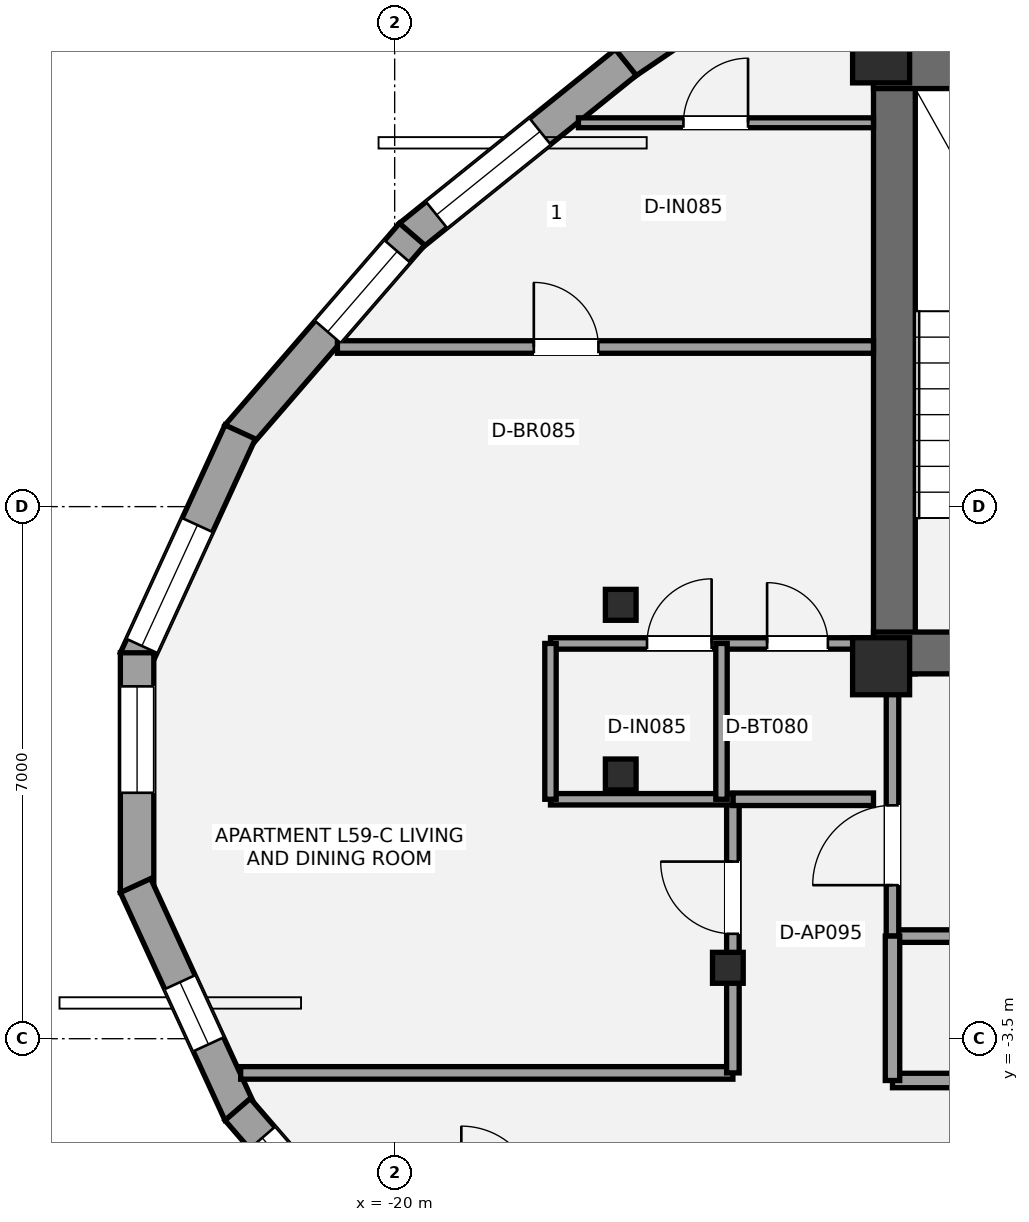
"""IFC4 building model, lengths in metres.
Left out: names, types, materials, properties, quantities, classifications, styles, units other than length and angle.
Written with IfcOpenShell. Run it as: python <this file> out.ifc"""

import sys

from ifc_helpers import new_model, si_unit, direction, frame, frame_2d, origin, origin_2d, place, context, subcontext, project, spatial, rectangle, i_section, extrude, element, fill, save


model = new_model("IFC4")
c1 = context("Model", 3, precision=1e-05, world=origin(), true_north=direction((0.0, 1.0)))
c2 = subcontext(c1, "Body", "Model", "MODEL_VIEW")
j1 = project(units=[si_unit("LENGTHUNIT", "METRE"), si_unit("PLANEANGLEUNIT", "RADIAN")], contexts=[c1])
p1 = place(None, origin())
s1 = spatial("IfcSite", under=j1, at=p1, CompositionType="ELEMENT")
p2 = place(p1, origin())
s2 = spatial("IfcBuilding", under=s1, at=p2, CompositionType="ELEMENT")
p3 = place(p2, frame((0.0, 0.0, 213.15)))
s3 = spatial("IfcBuildingStorey", under=s2, at=p3, CompositionType="ELEMENT", Elevation=213.15)
p4 = place(p3, frame((-13.425, 1.3, 0.0), z_axis=(0.0, 0.0, 1.0), x_axis=(0.0, 1.0, 0.0)))
e1 = element("IfcWall", 1, at=p4, inside=s3, PredefinedType="SHEAR", context=c2, shape_type="SweptSolid", body=[
    extrude(rectangle(XDim=8.25, YDim=0.55, at=frame_2d((4.125, 0.0))), origin(), (0.0, 0.0, 1.0), 3.15),
])
p5 = place(p3, frame((-13.7, 9.275, 0.0), z_axis=(0.0, 0.0, 1.0), x_axis=(1.0, 0.0, 0.0)))
e2 = element("IfcWall", 2, at=p5, inside=s3, PredefinedType="SHEAR", context=c2, shape_type="SweptSolid", body=[
    extrude(rectangle(XDim=9.175, YDim=0.55, at=frame_2d((4.587, 0.0))), origin(), (0.0, 0.0, 1.0), 3.15),
])
p6 = place(p3, frame((-4.925, 1.575, 0.0), z_axis=(0.0, 0.0, 1.0), x_axis=(-1.0, 0.0, 0.0)))
e3 = element("IfcWall", 3, at=p6, inside=s3, PredefinedType="SHEAR", context=c2, shape_type="SweptSolid", body=[
    extrude(rectangle(XDim=8.775, YDim=0.55, at=frame_2d((4.387, 0.0))), origin(), (0.0, 0.0, 1.0), 3.15),
])
p7 = place(p6, frame((5.375, 0.0, 0.0)))
e4 = element("IfcOpeningElement", 4, at=p7, cuts=e3, PredefinedType="OPENING", context=c2, shape_type="SweptSolid", body=[
    extrude(rectangle(XDim=1.05, YDim=2.15, at=frame_2d((0.525, 1.075))), frame((0.0, 0.285, 0.0), z_axis=(0.0, -1.0, 0.0), x_axis=(1.0, 0.0, 0.0)), (0.0, 0.0, 1.0), 0.57),
])
p8 = place(p6, frame((3.705, 0.0, 0.0)))
e5 = element("IfcOpeningElement", 5, at=p8, cuts=e3, PredefinedType="OPENING", context=c2, shape_type="SweptSolid", body=[
    extrude(rectangle(XDim=1.1, YDim=2.2, at=frame_2d((0.55, 1.1))), frame((0.0, 0.285, 0.0), z_axis=(0.0, -1.0, 0.0), x_axis=(1.0, 0.0, 0.0)), (0.0, 0.0, 1.0), 0.57),
])
for number, where, z_axis, x_axis in (
    (6, (-13.6, 1.4, 0.0), (0.0, 0.0, 1.0), (1.0, 0.0, 0.0)),
    (7, (-13.6, 9.45, 0.0), (0.0, 0.0, 1.0), (1.0, 0.0, 0.0)),
):
    element("IfcColumn", number, at=place(p3, frame(where, z_axis=z_axis, x_axis=x_axis)), inside=s3, PredefinedType="PILASTER", context=c2, shape_type="SweptSolid", body=[
        extrude(rectangle(XDim=0.75, YDim=0.75, at=origin_2d()), origin(), (0.0, 0.0, 1.0), 3.15),
    ])
for number, where, z_axis, x_axis in (
    (8, (-17.026, 2.208, 0.0), (0.0, 0.0, 1.0), (1.0, 0.0, 0.0)),
    (9, (-17.026, -0.024, 0.0), (0.0, 0.0, 1.0), (1.0, 0.0, 0.0)),
    (10, (-15.616, -2.567, 0.0), (0.0, 0.0, 1.0), (1.0, 0.0, 0.0)),
):
    element("IfcColumn", number, at=place(p3, frame(where, z_axis=z_axis, x_axis=x_axis)), inside=s3, PredefinedType="COLUMN", context=c2, shape_type="SweptSolid", body=[
        extrude(i_section(OverallWidth=0.404, OverallDepth=0.407, WebThickness=0.027, FlangeThickness=0.044, at=origin_2d()), origin(), (0.0, 0.0, 1.0), 3.15),
    ])
p9 = place(p3, frame((-16.973, 9.334, 0.0), z_axis=(0.0, 0.0, 1.0), x_axis=(0.827592777121, 0.561328954586, 0.0)))
e11 = element("IfcWall", 11, at=p9, inside=s3, PredefinedType="STANDARD", context=c2, shape_type="SweptSolid", body=[
    extrude(rectangle(XDim=3.704, YDim=0.44, at=frame_2d((1.852, 0.0))), origin(), (0.0, 0.0, 1.0), 2.336),
])
p10 = place(p9, frame((2.555, 0.0, 0.58)))
e12 = element("IfcOpeningElement", 12, at=p10, cuts=e11, PredefinedType="OPENING", context=c2, shape_type="SweptSolid", body=[
    extrude(rectangle(XDim=0.9, YDim=1.35, at=frame_2d((0.45, 0.675))), frame((0.0, 0.23, 0.0), z_axis=(0.0, -1.0, 0.0), x_axis=(1.0, 0.0, 0.0)), (0.0, 0.0, 1.0), 0.46),
])
p11 = place(p3, frame((-19.8, 7.057, 0.0), z_axis=(0.0, 0.0, 1.0), x_axis=(0.778794775864, 0.627278803314, 0.0)))
e13 = element("IfcWall", 13, at=p11, inside=s3, PredefinedType="STANDARD", context=c2, shape_type="SweptSolid", body=[
    extrude(rectangle(XDim=3.648, YDim=0.44, at=frame_2d((1.824, 0.0))), origin(), (0.0, 0.0, 1.0), 2.336),
])
p12 = place(p11, frame((0.45, 0.0, 0.55)))
e14 = element("IfcOpeningElement", 14, at=p12, cuts=e13, PredefinedType="OPENING", context=c2, shape_type="SweptSolid", body=[
    extrude(rectangle(XDim=1.75, YDim=1.55, at=frame_2d((0.875, 0.775))), frame((0.0, 0.23, 0.0), z_axis=(0.0, -1.0, 0.0), x_axis=(1.0, 0.0, 0.0)), (0.0, 0.0, 1.0), 0.46),
])
p13 = place(p3, frame((-22.066, 4.43, 0.0), z_axis=(0.0, 0.0, 1.0), x_axis=(0.654143325051, 0.75637061702, 0.0)))
e15 = element("IfcWall", 15, at=p13, inside=s3, PredefinedType="STANDARD", context=c2, shape_type="SweptSolid", body=[
    extrude(rectangle(XDim=3.508, YDim=0.44, at=frame_2d((1.754, 0.0))), origin(), (0.0, 0.0, 1.0), 2.336),
])
p14 = place(p13, frame((1.811, 0.0, 0.58)))
e16 = element("IfcOpeningElement", 16, at=p14, cuts=e15, PredefinedType="OPENING", context=c2, shape_type="SweptSolid", body=[
    extrude(rectangle(XDim=1.4, YDim=1.55, at=frame_2d((0.7, 0.775))), frame((0.0, 0.23, 0.0), z_axis=(0.0, -1.0, 0.0), x_axis=(1.0, 0.0, 0.0)), (0.0, 0.0, 1.0), 0.46),
])
p15 = place(p3, frame((-23.409, 1.485, 0.0), z_axis=(0.0, 0.0, 1.0), x_axis=(0.417358097416, 0.908742107818, 0.0)))
e17 = element("IfcWall", 17, at=p15, inside=s3, PredefinedType="STANDARD", context=c2, shape_type="SweptSolid", body=[
    extrude(rectangle(XDim=3.298, YDim=0.44, at=frame_2d((1.649, 0.0))), origin(), (0.0, 0.0, 1.0), 2.336),
])
p16 = place(p15, frame((0.2, 0.0, 0.55)))
e18 = element("IfcOpeningElement", 18, at=p16, cuts=e17, PredefinedType="OPENING", context=c2, shape_type="SweptSolid", body=[
    extrude(rectangle(XDim=1.75, YDim=1.55, at=frame_2d((0.875, 0.775))), frame((0.0, 0.23, 0.0), z_axis=(0.0, -1.0, 0.0), x_axis=(1.0, 0.0, 0.0)), (0.0, 0.0, 1.0), 0.46),
])
p17 = place(p3, frame((-23.389, -1.577, 0.0), z_axis=(0.0, 0.0, 1.0), x_axis=(0.0, 1.0, 0.0)))
e19 = element("IfcWall", 19, at=p17, inside=s3, PredefinedType="STANDARD", context=c2, shape_type="SweptSolid", body=[
    extrude(rectangle(XDim=3.154, YDim=0.44, at=frame_2d((1.577, 0.0))), origin(), (0.0, 0.0, 1.0), 2.336),
])
p18 = place(p17, frame((1.312, 0.0, 0.55)))
e20 = element("IfcOpeningElement", 20, at=p18, cuts=e19, PredefinedType="OPENING", context=c2, shape_type="SweptSolid", body=[
    extrude(rectangle(XDim=1.4, YDim=1.55, at=frame_2d((0.7, 0.775))), frame((0.0, 0.23, 0.0), z_axis=(0.0, -1.0, 0.0), x_axis=(1.0, 0.0, 0.0)), (0.0, 0.0, 1.0), 0.46),
])
p19 = place(p3, frame((-22.033, -4.482, 0.0), z_axis=(0.0, 0.0, 1.0), x_axis=(-0.417358097416, 0.908742107818, 0.0)))
e21 = element("IfcWall", 21, at=p19, inside=s3, PredefinedType="STANDARD", context=c2, shape_type="SweptSolid", body=[
    extrude(rectangle(XDim=3.298, YDim=0.44, at=frame_2d((1.649, 0.0))), origin(), (0.0, 0.0, 1.0), 2.336),
])
p20 = place(p19, frame((0.999, 0.0, 0.58)))
e22 = element("IfcOpeningElement", 22, at=p20, cuts=e21, PredefinedType="OPENING", context=c2, shape_type="SweptSolid", body=[
    extrude(rectangle(XDim=0.9, YDim=1.35, at=frame_2d((0.45, 0.675))), frame((0.0, 0.23, 0.0), z_axis=(0.0, -1.0, 0.0), x_axis=(1.0, 0.0, 0.0)), (0.0, 0.0, 1.0), 0.46),
])
p21 = place(p3, frame((-19.771, -7.084, 0.0), z_axis=(0.0, 0.0, 1.0), x_axis=(-0.654143325051, 0.75637061702, 0.0)))
e23 = element("IfcWall", 23, at=p21, inside=s3, PredefinedType="STANDARD", context=c2, shape_type="SweptSolid", body=[
    extrude(rectangle(XDim=3.508, YDim=0.44, at=frame_2d((1.754, 0.0))), origin(), (0.0, 0.0, 1.0), 2.336),
])
p22 = place(p21, frame((2.114, 0.0, 0.58)))
e24 = element("IfcOpeningElement", 24, at=p22, cuts=e23, PredefinedType="OPENING", context=c2, shape_type="SweptSolid", body=[
    extrude(rectangle(XDim=0.9, YDim=1.35, at=frame_2d((0.45, 0.675))), frame((0.0, 0.23, 0.0), z_axis=(0.0, -1.0, 0.0), x_axis=(1.0, 0.0, 0.0)), (0.0, 0.0, 1.0), 0.46),
])
p23 = place(p3, frame((-13.45, -2.15, 0.0), z_axis=(0.0, 0.0, 1.0), x_axis=(1.0, 0.0, 0.0)))
e25 = element("IfcWall", 25, at=p23, inside=s3, PredefinedType="PARTITIONING", context=c2, shape_type="SweptSolid", body=[
    extrude(rectangle(XDim=6.25, YDim=0.165, at=frame_2d((3.125, 0.0))), origin(), (0.0, 0.0, 1.0), 2.423),
])
p24 = place(p3, frame((-13.45, -2.15, 0.0), z_axis=(0.0, 0.0, 1.0), x_axis=(0.0, 1.0, 0.0)))
e26 = element("IfcWall", 26, at=p24, inside=s3, PredefinedType="PARTITIONING", context=c2, shape_type="SweptSolid", body=[
    extrude(rectangle(XDim=3.5, YDim=0.165, at=frame_2d((1.75, 0.0))), origin(), (0.0, 0.0, 1.0), 2.423),
])
p25 = place(p24, frame((0.67, 0.0, 0.0)))
e27 = element("IfcOpeningElement", 27, at=p25, cuts=e26, PredefinedType="OPENING", context=c2, shape_type="SweptSolid", body=[
    extrude(rectangle(XDim=1.05, YDim=2.15, at=frame_2d((0.525, 1.075))), frame((0.0, 0.093, 0.0), z_axis=(0.0, -1.0, 0.0), x_axis=(1.0, 0.0, 0.0)), (0.0, 0.0, 1.0), 0.185),
])
p26 = place(p3, frame((-13.45, -4.05, 0.0), z_axis=(0.0, 0.0, 1.0), x_axis=(1.0, 0.0, 0.0)))
e28 = element("IfcWall", 28, at=p26, inside=s3, PredefinedType="PLUMBINGWALL", context=c2, shape_type="SweptSolid", body=[
    extrude(rectangle(XDim=11.35, YDim=0.19, at=frame_2d((5.675, 0.0))), origin(), (0.0, 0.0, 1.0), 2.357),
])
p27 = place(p26, frame((1.25, 0.0, 0.0)))
e29 = element("IfcOpeningElement", 29, at=p27, cuts=e28, PredefinedType="OPENING", context=c2, shape_type="SweptSolid", body=[
    extrude(rectangle(XDim=0.85, YDim=2.1, at=frame_2d((0.425, 1.05))), frame((0.0, 0.105, 0.0), z_axis=(0.0, -1.0, 0.0), x_axis=(1.0, 0.0, 0.0)), (0.0, 0.0, 1.0), 0.21),
])
p28 = place(p26, frame((5.1, 0.0, 0.0)))
e30 = element("IfcOpeningElement", 30, at=p28, cuts=e28, PredefinedType="OPENING", context=c2, shape_type="SweptSolid", body=[
    extrude(rectangle(XDim=0.85, YDim=2.1, at=frame_2d((0.425, 1.05))), frame((0.0, 0.105, 0.0), z_axis=(0.0, -1.0, 0.0), x_axis=(1.0, 0.0, 0.0)), (0.0, 0.0, 1.0), 0.21),
])
p29 = place(p26, frame((8.95, 0.0, 0.0)))
e31 = element("IfcOpeningElement", 31, at=p29, cuts=e28, PredefinedType="OPENING", context=c2, shape_type="SweptSolid", body=[
    extrude(rectangle(XDim=0.95, YDim=2.15, at=frame_2d((0.475, 1.075))), frame((0.0, 0.105, 0.0), z_axis=(0.0, -1.0, 0.0), x_axis=(1.0, 0.0, 0.0)), (0.0, 0.0, 1.0), 0.21),
])
p30 = place(p3, frame((-13.45, -4.05, 0.0), z_axis=(0.0, 0.0, 1.0), x_axis=(0.0, 1.0, 0.0)))
e32 = element("IfcWall", 32, at=p30, inside=s3, PredefinedType="PLUMBINGWALL", context=c2, shape_type="SweptSolid", body=[
    extrude(rectangle(XDim=1.9, YDim=0.19, at=frame_2d((0.95, 0.0))), origin(), (0.0, 0.0, 1.0), 2.423),
])
p31 = place(p3, frame((-22.026, -3.95, 0.0), z_axis=(0.0, 0.0, 1.0), x_axis=(1.0, 0.0, 0.0)))
e33 = element("IfcWall", 33, at=p31, inside=s3, PredefinedType="PARTITIONING", context=c2, shape_type="SweptSolid", body=[
    extrude(rectangle(XDim=6.476, YDim=0.165, at=frame_2d((3.238, 0.0))), origin(), (0.0, 0.0, 1.0), 2.423),
])
p32 = place(p3, frame((-15.55, -3.95, 0.0), z_axis=(0.0, 0.0, 1.0), x_axis=(0.0, 1.0, 0.0)))
e34 = element("IfcWall", 34, at=p32, inside=s3, PredefinedType="PARTITIONING", context=c2, shape_type="SweptSolid", body=[
    extrude(rectangle(XDim=3.6, YDim=0.165, at=frame_2d((1.8, 0.0))), origin(), (0.0, 0.0, 1.0), 2.357),
])
p33 = place(p32, frame((1.83, 0.0, 0.0)))
e35 = element("IfcOpeningElement", 35, at=p33, cuts=e34, PredefinedType="OPENING", context=c2, shape_type="SweptSolid", body=[
    extrude(rectangle(XDim=0.95, YDim=2.15, at=frame_2d((0.475, 1.075))), frame((0.0, 0.093, 0.0), z_axis=(0.0, -1.0, 0.0), x_axis=(1.0, 0.0, 0.0)), (0.0, 0.0, 1.0), 0.185),
])
p34 = place(p3, frame((-15.55, -0.35, 0.0), z_axis=(0.0, 0.0, 1.0), x_axis=(1.0, 0.0, 0.0)))
e36 = element("IfcWall", 36, at=p34, inside=s3, PredefinedType="PARTITIONING", context=c2, shape_type="SweptSolid", body=[
    extrude(rectangle(XDim=1.85, YDim=0.165, at=frame_2d((0.925, 0.0))), origin(), (0.0, 0.0, 1.0), 2.423),
])
p35 = place(p3, frame((-20.753, 5.6, 0.0), z_axis=(0.0, 0.0, 1.0), x_axis=(1.0, 0.0, 0.0)))
e37 = element("IfcWall", 37, at=p35, inside=s3, PredefinedType="PARTITIONING", context=c2, shape_type="SweptSolid", body=[
    extrude(rectangle(XDim=7.053, YDim=0.165, at=frame_2d((3.527, 0.0))), origin(), (0.0, 0.0, 1.0), 2.423),
])
p36 = place(p35, frame((2.584, 0.0, 0.0)))
e38 = element("IfcOpeningElement", 38, at=p36, cuts=e37, PredefinedType="OPENING", context=c2, shape_type="SweptSolid", body=[
    extrude(rectangle(XDim=0.85, YDim=2.1, at=frame_2d((0.425, 1.05))), frame((0.0, 0.093, 0.0), z_axis=(0.0, -1.0, 0.0), x_axis=(1.0, 0.0, 0.0)), (0.0, 0.0, 1.0), 0.185),
])
p37 = place(p3, frame((-17.95, 1.7, 0.0), z_axis=(0.0, 0.0, 1.0), x_axis=(1.0, 0.0, 0.0)))
e39 = element("IfcWall", 39, at=p37, inside=s3, PredefinedType="PLUMBINGWALL", context=c2, shape_type="SweptSolid", body=[
    extrude(rectangle(XDim=4.25, YDim=0.15, at=frame_2d((2.125, 0.0))), origin(), (0.0, 0.0, 1.0), 2.423),
])
p38 = place(p37, frame((2.85, 0.0, 0.0)))
e40 = element("IfcOpeningElement", 40, at=p38, cuts=e39, PredefinedType="OPENING", context=c2, shape_type="SweptSolid", body=[
    extrude(rectangle(XDim=0.8, YDim=2.1, at=frame_2d((0.4, 1.05))), frame((0.0, 0.085, 0.0), z_axis=(0.0, -1.0, 0.0), x_axis=(1.0, 0.0, 0.0)), (0.0, 0.0, 1.0), 0.17),
])
p39 = place(p37, frame((1.27, 0.0, 0.0)))
e41 = element("IfcOpeningElement", 41, at=p39, cuts=e39, PredefinedType="OPENING", context=c2, shape_type="SweptSolid", body=[
    extrude(rectangle(XDim=0.85, YDim=2.1, at=frame_2d((0.425, 1.05))), frame((0.0, 0.085, 0.0), z_axis=(0.0, -1.0, 0.0), x_axis=(1.0, 0.0, 0.0)), (0.0, 0.0, 1.0), 0.17),
])
p40 = place(p3, frame((-17.95, -0.35, 0.0), z_axis=(0.0, 0.0, 1.0), x_axis=(1.0, 0.0, 0.0)))
e42 = element("IfcWall", 42, at=p40, inside=s3, PredefinedType="PLUMBINGWALL", context=c2, shape_type="SweptSolid", body=[
    extrude(rectangle(XDim=2.4, YDim=0.15, at=frame_2d((1.2, 0.0))), origin(), (0.0, 0.0, 1.0), 2.423),
])
p41 = place(p3, frame((-15.7, -0.35, 0.0), z_axis=(0.0, 0.0, 1.0), x_axis=(0.0, 1.0, 0.0)))
e43 = element("IfcWall", 43, at=p41, inside=s3, PredefinedType="PLUMBINGWALL", context=c2, shape_type="SweptSolid", body=[
    extrude(rectangle(XDim=2.05, YDim=0.15, at=frame_2d((1.025, 0.0))), origin(), (0.0, 0.0, 1.0), 2.97),
])
p42 = place(p3, frame((-17.95, -0.35, 0.0), z_axis=(0.0, 0.0, 1.0), x_axis=(0.0, 1.0, 0.0)))
e44 = element("IfcWall", 44, at=p42, inside=s3, PredefinedType="PLUMBINGWALL", context=c2, shape_type="SweptSolid", body=[
    extrude(rectangle(XDim=2.05, YDim=0.15, at=frame_2d((1.025, 0.0))), origin(), (0.0, 0.0, 1.0), 2.423),
])
p43 = place(p3, frame((-17.582, 8.55, 0.0), z_axis=(0.0, 0.0, 1.0), x_axis=(1.0, 0.0, 0.0)))
e45 = element("IfcWall", 45, at=p43, inside=s3, PredefinedType="PARTITIONING", context=c2, shape_type="SweptSolid", body=[
    extrude(rectangle(XDim=3.882, YDim=0.13, at=frame_2d((1.941, 0.0))), origin(), (0.0, 0.0, 1.0), 2.423),
])
p44 = place(p43, frame((1.381, 0.0, 0.0)))
e46 = element("IfcOpeningElement", 46, at=p44, cuts=e45, PredefinedType="OPENING", context=c2, shape_type="SweptSolid", body=[
    extrude(rectangle(XDim=0.85, YDim=2.1, at=frame_2d((0.425, 1.05))), frame((0.0, 0.075, 0.0), z_axis=(0.0, -1.0, 0.0), x_axis=(1.0, 0.0, 0.0)), (0.0, 0.0, 1.0), 0.15),
])
p45 = place(p12, origin())
e47 = element("IfcWindow", 47, at=p45, inside=s3, PartitioningType="SINGLE_PANEL", PredefinedType="WINDOW", context=c2, shape_type="SweptSolid", body=[
    extrude(rectangle(XDim=1.75, YDim=1.55, at=frame_2d((0.875, 0.775))), frame((0.0, -0.01, 0.0), z_axis=(0.0, -1.0, 0.0), x_axis=(1.0, 0.0, 0.0)), (0.0, 0.0, 1.0), 0.06),
])
fill(e14, e47)
p46 = place(p14, origin())
e48 = element("IfcWindow", 48, at=p46, inside=s3, PartitioningType="SINGLE_PANEL", PredefinedType="WINDOW", context=c2, shape_type="SweptSolid", body=[
    extrude(rectangle(XDim=1.4, YDim=1.55, at=frame_2d((0.7, 0.775))), frame((0.0, -0.01, 0.0), z_axis=(0.0, -1.0, 0.0), x_axis=(1.0, 0.0, 0.0)), (0.0, 0.0, 1.0), 0.06),
])
fill(e16, e48)
p47 = place(p16, origin())
e49 = element("IfcWindow", 49, at=p47, inside=s3, PartitioningType="SINGLE_PANEL", PredefinedType="WINDOW", context=c2, shape_type="SweptSolid", body=[
    extrude(rectangle(XDim=1.75, YDim=1.55, at=frame_2d((0.875, 0.775))), frame((0.0, -0.01, 0.0), z_axis=(0.0, -1.0, 0.0), x_axis=(1.0, 0.0, 0.0)), (0.0, 0.0, 1.0), 0.06),
])
fill(e18, e49)
p48 = place(p18, origin())
e50 = element("IfcWindow", 50, at=p48, inside=s3, PartitioningType="SINGLE_PANEL", PredefinedType="WINDOW", context=c2, shape_type="SweptSolid", body=[
    extrude(rectangle(XDim=1.4, YDim=1.55, at=frame_2d((0.7, 0.775))), frame((0.0, -0.01, 0.0), z_axis=(0.0, -1.0, 0.0), x_axis=(1.0, 0.0, 0.0)), (0.0, 0.0, 1.0), 0.06),
])
fill(e20, e50)
p49 = place(p20, origin())
e51 = element("IfcWindow", 51, at=p49, inside=s3, PartitioningType="SINGLE_PANEL", PredefinedType="WINDOW", context=c2, shape_type="SweptSolid", body=[
    extrude(rectangle(XDim=0.9, YDim=1.35, at=frame_2d((0.45, 0.675))), frame((0.0, -0.01, 0.0), z_axis=(0.0, -1.0, 0.0), x_axis=(1.0, 0.0, 0.0)), (0.0, 0.0, 1.0), 0.06),
])
fill(e22, e51)
p50 = place(p22, origin())
e52 = element("IfcWindow", 52, at=p50, inside=s3, PartitioningType="SINGLE_PANEL", PredefinedType="WINDOW", context=c2, shape_type="SweptSolid", body=[
    extrude(rectangle(XDim=0.9, YDim=1.35, at=frame_2d((0.45, 0.675))), frame((0.0, -0.01, 0.0), z_axis=(0.0, -1.0, 0.0), x_axis=(1.0, 0.0, 0.0)), (0.0, 0.0, 1.0), 0.06),
])
fill(e24, e52)
p51 = place(p25, origin())
e53 = element("IfcDoor", 53, at=p51, inside=s3, OperationType="SINGLE_SWING_LEFT", PredefinedType="DOOR", context=c2, shape_type="SweptSolid", body=[
    extrude(rectangle(XDim=1.05, YDim=2.15, at=frame_2d((0.525, 1.075))), frame((0.0, 0.025, 0.0), z_axis=(0.0, -1.0, 0.0), x_axis=(1.0, 0.0, 0.0)), (0.0, 0.0, 1.0), 0.05),
])
fill(e27, e53)
p52 = place(p33, origin())
e54 = element("IfcDoor", 54, at=p52, inside=s3, OperationType="SINGLE_SWING_RIGHT", PredefinedType="DOOR", context=c2, shape_type="SweptSolid", body=[
    extrude(rectangle(XDim=0.95, YDim=2.15, at=frame_2d((0.475, 1.075))), frame((0.0, 0.025, 0.0), z_axis=(0.0, -1.0, 0.0), x_axis=(1.0, 0.0, 0.0)), (0.0, 0.0, 1.0), 0.05),
])
fill(e35, e54)
p53 = place(p38, origin())
e55 = element("IfcDoor", 55, at=p53, inside=s3, OperationType="SINGLE_SWING_LEFT", PredefinedType="DOOR", context=c2, shape_type="SweptSolid", body=[
    extrude(rectangle(XDim=0.8, YDim=2.1, at=frame_2d((0.4, 1.05))), frame((0.0, 0.025, 0.0), z_axis=(0.0, -1.0, 0.0), x_axis=(1.0, 0.0, 0.0)), (0.0, 0.0, 1.0), 0.05),
])
fill(e40, e55)
p54 = place(p39, origin())
e56 = element("IfcDoor", 56, at=p54, inside=s3, OperationType="SINGLE_SWING_RIGHT", PredefinedType="DOOR", context=c2, shape_type="SweptSolid", body=[
    extrude(rectangle(XDim=0.85, YDim=2.1, at=frame_2d((0.425, 1.05))), frame((0.0, 0.025, 0.0), z_axis=(0.0, -1.0, 0.0), x_axis=(1.0, 0.0, 0.0)), (0.0, 0.0, 1.0), 0.05),
])
fill(e41, e56)
p55 = place(p36, origin())
e57 = element("IfcDoor", 57, at=p55, inside=s3, OperationType="SINGLE_SWING_LEFT", PredefinedType="DOOR", context=c2, shape_type="SweptSolid", body=[
    extrude(rectangle(XDim=0.85, YDim=2.1, at=frame_2d((0.425, 1.05))), frame((0.0, 0.025, 0.0), z_axis=(0.0, -1.0, 0.0), x_axis=(1.0, 0.0, 0.0)), (0.0, 0.0, 1.0), 0.05),
])
fill(e38, e57)
p56 = place(p44, origin())
e58 = element("IfcDoor", 58, at=p56, inside=s3, OperationType="SINGLE_SWING_RIGHT", PredefinedType="DOOR", context=c2, shape_type="SweptSolid", body=[
    extrude(rectangle(XDim=0.85, YDim=2.1, at=frame_2d((0.425, 1.05))), frame((0.0, 0.025, 0.0), z_axis=(0.0, -1.0, 0.0), x_axis=(1.0, 0.0, 0.0)), (0.0, 0.0, 1.0), 0.05),
])
fill(e46, e58)
save(model, sys.argv[1])
